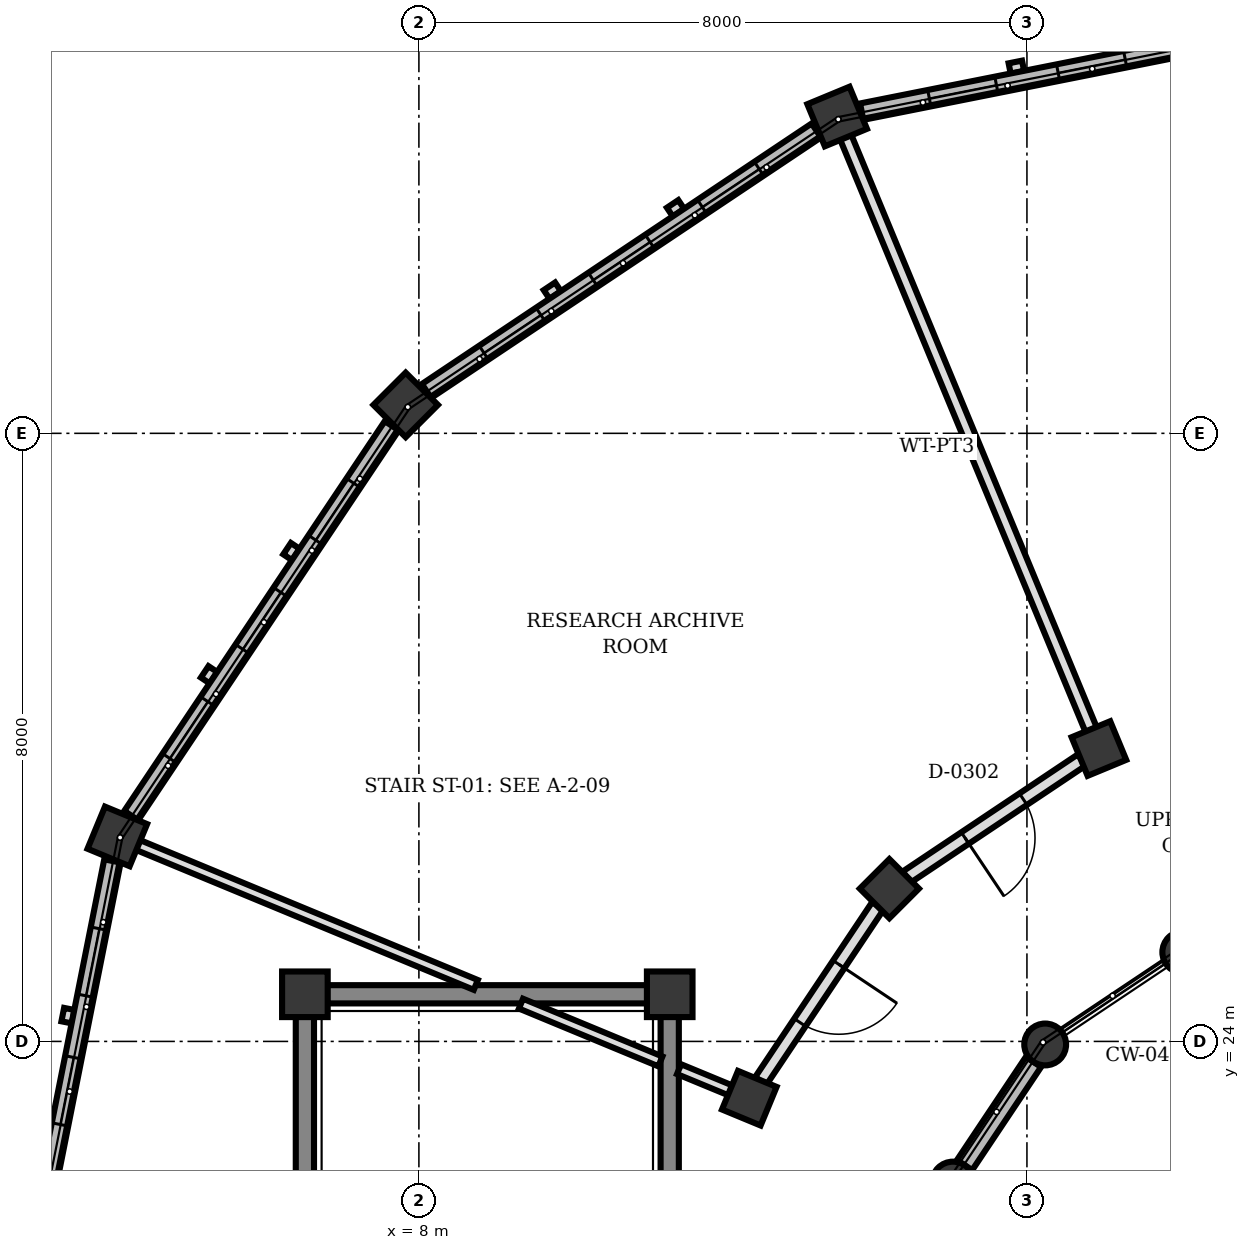
"""IFC4 building model, lengths in metres.
Left out: names, types, materials, properties, quantities, classifications, styles, units other than length and angle.
Written with IfcOpenShell. Run it as: python <this file> out.ifc"""

import sys

from ifc_helpers import new_model, si_unit, direction, frame, frame_2d, origin, origin_2d, place, context, subcontext, project, spatial, rectangle, circle, extrude, element, fill, save


model = new_model("IFC4")
c1 = context("Model", 3, precision=1e-05, world=origin(), true_north=direction((0.0, 1.0)))
c2 = subcontext(c1, "Body", "Model", "MODEL_VIEW")
j1 = project(units=[si_unit("LENGTHUNIT", "METRE"), si_unit("PLANEANGLEUNIT", "RADIAN")], contexts=[c1])
p1 = place(None, origin())
s1 = spatial("IfcSite", under=j1, at=p1, CompositionType="ELEMENT")
p2 = place(p1, origin())
s2 = spatial("IfcBuilding", under=s1, at=p2, CompositionType="ELEMENT")
p3 = place(p2, frame((0.0, 0.0, 8.5)))
s3 = spatial("IfcBuildingStorey", under=s2, at=p3, CompositionType="ELEMENT", Elevation=8.5)
for number, where, z_axis, x_axis in (
    (1, (11.3, 24.62, 0.0), (0.0, 0.0, 1.0), (1.0, 0.0, 0.0)),
    (2, (6.5, 24.62, 0.0), (0.0, 0.0, 1.0), (1.0, 0.0, 0.0)),
):
    element("IfcColumn", number, at=place(p3, frame(where, z_axis=z_axis, x_axis=x_axis)), inside=s3, PredefinedType="COLUMN", context=c2, shape_type="SweptSolid", body=[
        extrude(rectangle(XDim=0.6, YDim=0.6, at=origin_2d()), origin(), (0.0, 0.0, 1.0), 4.0),
    ])
for number, where, z_axis, x_axis in (
    (3, (18.057, 25.174, 0.0), (0.0, 0.0, 1.0), (1.0, 0.0, 0.0)),
    (4, (16.24, 23.96, 0.0), (0.0, 0.0, 1.0), (1.0, 0.0, 0.0)),
    (5, (15.026, 22.143, 0.0), (0.0, 0.0, 1.0), (1.0, 0.0, 0.0)),
):
    element("IfcColumn", number, at=place(p3, frame(where, z_axis=z_axis, x_axis=x_axis)), inside=s3, PredefinedType="COLUMN", context=c2, shape_type="SweptSolid", body=[
        extrude(circle(Radius=0.275, at=origin_2d()), origin(), (0.0, 0.0, 1.0), 4.0),
    ])
for number, where, z_axis, x_axis in (
    (6, (16.947, 27.853, 0.0), (0.0, 0.0, 1.0), (-0.383, 0.924, 0.0)),
    (7, (14.19, 26.01, 0.0), (0.0, 0.0, 1.0), (-0.707, 0.707, 0.0)),
    (8, (12.347, 23.253, 0.0), (0.0, 0.0, 1.0), (-0.924, 0.383, 0.0)),
):
    element("IfcColumn", number, at=place(p3, frame(where, z_axis=z_axis, x_axis=x_axis)), inside=s3, PredefinedType="COLUMN", context=c2, shape_type="SweptSolid", body=[
        extrude(rectangle(XDim=0.55, YDim=0.55, at=origin_2d()), origin(), (0.0, 0.0, 1.0), 4.0),
    ])
for number, where, z_axis, x_axis in (
    (9, (13.503, 36.168, 0.0), (0.0, 0.0, 1.0), (-0.383, 0.924, 0.0)),
    (10, (7.826, 32.374, 0.0), (0.0, 0.0, 1.0), (-0.707, 0.707, 0.0)),
    (11, (4.032, 26.697, 0.0), (0.0, 0.0, 1.0), (-0.924, 0.383, 0.0)),
):
    element("IfcColumn", number, at=place(p3, frame(where, z_axis=z_axis, x_axis=x_axis)), inside=s3, PredefinedType="COLUMN", context=c2, shape_type="SweptSolid", body=[
        extrude(rectangle(XDim=0.6, YDim=0.6, at=origin_2d()), origin(), (0.0, 0.0, 1.0), 4.0),
    ])
p4 = place(p3, frame((13.826, 36.232, 0.0), z_axis=(0.0, 0.0, 1.0), x_axis=(0.980770460131, 0.195164813773, 0.0)))
e12 = element("IfcWall", 12, at=p4, inside=s3, PredefinedType="SOLIDWALL", context=c2, shape_type="SweptSolid", body=[
    extrude(rectangle(XDim=6.17, YDim=0.22, at=frame_2d((3.085, 0.0))), origin(), (0.0, 0.0, 1.0), 3.172),
])
p5 = place(p4, frame((0.907, 0.0, 0.85)))
e13 = element("IfcOpeningElement", 13, at=p5, cuts=e12, PredefinedType="OPENING", context=c2, shape_type="SweptSolid", body=[
    extrude(rectangle(XDim=0.9, YDim=1.4, at=frame_2d((0.45, 0.7))), frame((0.0, 0.12, 0.0), z_axis=(0.0, -1.0, 0.0), x_axis=(1.0, 0.0, 0.0)), (0.0, 0.0, 1.0), 0.24),
])
p6 = place(p4, frame((2.635, 0.0, 0.85)))
e14 = element("IfcOpeningElement", 14, at=p6, cuts=e12, PredefinedType="OPENING", context=c2, shape_type="SweptSolid", body=[
    extrude(rectangle(XDim=0.9, YDim=1.4, at=frame_2d((0.45, 0.7))), frame((0.0, 0.12, 0.0), z_axis=(0.0, -1.0, 0.0), x_axis=(1.0, 0.0, 0.0)), (0.0, 0.0, 1.0), 0.24),
])
p7 = place(p4, frame((4.362, 0.0, 0.85)))
e15 = element("IfcOpeningElement", 15, at=p7, cuts=e12, PredefinedType="OPENING", context=c2, shape_type="SweptSolid", body=[
    extrude(rectangle(XDim=0.9, YDim=1.4, at=frame_2d((0.45, 0.7))), frame((0.0, 0.12, 0.0), z_axis=(0.0, -1.0, 0.0), x_axis=(1.0, 0.0, 0.0)), (0.0, 0.0, 1.0), 0.24),
])
p8 = place(p3, frame((8.1, 32.557, 0.0), z_axis=(0.0, 0.0, 1.0), x_axis=(0.831379966495, 0.555704374025, 0.0)))
e16 = element("IfcWall", 16, at=p8, inside=s3, PredefinedType="SOLIDWALL", context=c2, shape_type="SweptSolid", body=[
    extrude(rectangle(XDim=6.169, YDim=0.22, at=frame_2d((3.084, 0.0))), origin(), (0.0, 0.0, 1.0), 3.172),
])
p9 = place(p8, frame((0.907, 0.0, 0.85)))
e17 = element("IfcOpeningElement", 17, at=p9, cuts=e16, PredefinedType="OPENING", context=c2, shape_type="SweptSolid", body=[
    extrude(rectangle(XDim=0.9, YDim=1.4, at=frame_2d((0.45, 0.7))), frame((0.0, 0.12, 0.0), z_axis=(0.0, -1.0, 0.0), x_axis=(1.0, 0.0, 0.0)), (0.0, 0.0, 1.0), 0.24),
])
p10 = place(p8, frame((2.635, 0.0, 0.85)))
e18 = element("IfcOpeningElement", 18, at=p10, cuts=e16, PredefinedType="OPENING", context=c2, shape_type="SweptSolid", body=[
    extrude(rectangle(XDim=0.9, YDim=1.4, at=frame_2d((0.45, 0.7))), frame((0.0, 0.12, 0.0), z_axis=(0.0, -1.0, 0.0), x_axis=(1.0, 0.0, 0.0)), (0.0, 0.0, 1.0), 0.24),
])
p11 = place(p8, frame((4.362, 0.0, 0.85)))
e19 = element("IfcOpeningElement", 19, at=p11, cuts=e16, PredefinedType="OPENING", context=c2, shape_type="SweptSolid", body=[
    extrude(rectangle(XDim=0.9, YDim=1.4, at=frame_2d((0.45, 0.7))), frame((0.0, 0.12, 0.0), z_axis=(0.0, -1.0, 0.0), x_axis=(1.0, 0.0, 0.0)), (0.0, 0.0, 1.0), 0.24),
])
p12 = place(p3, frame((4.215, 26.971, 0.0), z_axis=(0.0, 0.0, 1.0), x_axis=(0.555658736667, 0.831410469242, 0.0)))
e20 = element("IfcWall", 20, at=p12, inside=s3, PredefinedType="SOLIDWALL", context=c2, shape_type="SweptSolid", body=[
    extrude(rectangle(XDim=6.169, YDim=0.22, at=frame_2d((3.084, 0.0))), origin(), (0.0, 0.0, 1.0), 3.172),
])
p13 = place(p12, frame((0.907, 0.0, 0.85)))
e21 = element("IfcOpeningElement", 21, at=p13, cuts=e20, PredefinedType="OPENING", context=c2, shape_type="SweptSolid", body=[
    extrude(rectangle(XDim=0.9, YDim=1.4, at=frame_2d((0.45, 0.7))), frame((0.0, 0.12, 0.0), z_axis=(0.0, -1.0, 0.0), x_axis=(1.0, 0.0, 0.0)), (0.0, 0.0, 1.0), 0.24),
])
p14 = place(p12, frame((2.635, 0.0, 0.85)))
e22 = element("IfcOpeningElement", 22, at=p14, cuts=e20, PredefinedType="OPENING", context=c2, shape_type="SweptSolid", body=[
    extrude(rectangle(XDim=0.9, YDim=1.4, at=frame_2d((0.45, 0.7))), frame((0.0, 0.12, 0.0), z_axis=(0.0, -1.0, 0.0), x_axis=(1.0, 0.0, 0.0)), (0.0, 0.0, 1.0), 0.24),
])
p15 = place(p12, frame((4.362, 0.0, 0.85)))
e23 = element("IfcOpeningElement", 23, at=p15, cuts=e20, PredefinedType="OPENING", context=c2, shape_type="SweptSolid", body=[
    extrude(rectangle(XDim=0.9, YDim=1.4, at=frame_2d((0.45, 0.7))), frame((0.0, 0.12, 0.0), z_axis=(0.0, -1.0, 0.0), x_axis=(1.0, 0.0, 0.0)), (0.0, 0.0, 1.0), 0.24),
])
p16 = place(p3, frame((16.086, 23.73, 0.0), z_axis=(0.0, 0.0, 1.0), x_axis=(-0.555287078904, -0.83165874011, 0.0)))
e24 = element("IfcWall", 24, at=p16, inside=s3, PredefinedType="SOLIDWALL", context=c2, shape_type="SweptSolid", body=[
    extrude(rectangle(XDim=1.632, YDim=0.24, at=frame_2d((0.816, 0.0))), origin(), (0.0, 0.0, 1.0), 3.222),
])
p17 = place(p3, frame((2.764, 20.323, 0.0), z_axis=(0.0, 0.0, 1.0), x_axis=(0.195164813773, 0.980770460131, 0.0)))
e25 = element("IfcWall", 25, at=p17, inside=s3, PredefinedType="SOLIDWALL", context=c2, shape_type="SweptSolid", body=[
    extrude(rectangle(XDim=6.17, YDim=0.22, at=frame_2d((3.085, 0.0))), origin(), (0.0, 0.0, 1.0), 3.172),
])
p18 = place(p17, frame((0.907, 0.0, 0.85)))
e26 = element("IfcOpeningElement", 26, at=p18, cuts=e25, PredefinedType="OPENING", context=c2, shape_type="SweptSolid", body=[
    extrude(rectangle(XDim=0.9, YDim=1.4, at=frame_2d((0.45, 0.7))), frame((0.0, 0.12, 0.0), z_axis=(0.0, -1.0, 0.0), x_axis=(1.0, 0.0, 0.0)), (0.0, 0.0, 1.0), 0.24),
])
p19 = place(p17, frame((2.635, 0.0, 0.85)))
e27 = element("IfcOpeningElement", 27, at=p19, cuts=e25, PredefinedType="OPENING", context=c2, shape_type="SweptSolid", body=[
    extrude(rectangle(XDim=0.9, YDim=1.4, at=frame_2d((0.45, 0.7))), frame((0.0, 0.12, 0.0), z_axis=(0.0, -1.0, 0.0), x_axis=(1.0, 0.0, 0.0)), (0.0, 0.0, 1.0), 0.24),
])
p20 = place(p17, frame((4.362, 0.0, 0.85)))
e28 = element("IfcOpeningElement", 28, at=p20, cuts=e25, PredefinedType="OPENING", context=c2, shape_type="SweptSolid", body=[
    extrude(rectangle(XDim=0.9, YDim=1.4, at=frame_2d((0.45, 0.7))), frame((0.0, 0.12, 0.0), z_axis=(0.0, -1.0, 0.0), x_axis=(1.0, 0.0, 0.0)), (0.0, 0.0, 1.0), 0.24),
])
p21 = place(p3, frame((6.5, 16.192, 0.0), z_axis=(0.0, 0.0, 1.0), x_axis=(0.0, 1.0, 0.0)))
e29 = element("IfcWall", 29, at=p21, inside=s3, PredefinedType="SHEAR", context=c2, shape_type="SweptSolid", body=[
    extrude(rectangle(XDim=8.136, YDim=0.24, at=frame_2d((4.068, 0.0))), origin(), (0.0, 0.0, 1.0), 3.74),
])
p22 = place(p3, frame((11.3, 24.328, 0.0), z_axis=(0.0, 0.0, 1.0), x_axis=(0.0, -1.0, 0.0)))
e30 = element("IfcWall", 30, at=p22, inside=s3, PredefinedType="SHEAR", context=c2, shape_type="SweptSolid", body=[
    extrude(rectangle(XDim=8.136, YDim=0.24, at=frame_2d((4.068, 0.0))), origin(), (0.0, 0.0, 1.0), 3.74),
])
p23 = place(p22, frame((6.244, 0.0, 0.0)))
e31 = element("IfcOpeningElement", 31, at=p23, cuts=e30, PredefinedType="OPENING", context=c2, shape_type="SweptSolid", body=[
    extrude(rectangle(XDim=0.88, YDim=2.1, at=frame_2d((0.44, 1.05))), frame((0.0, 0.13, 0.0), z_axis=(0.0, -1.0, 0.0), x_axis=(1.0, 0.0, 0.0)), (0.0, 0.0, 1.0), 0.26),
])
p24 = place(p3, frame((11.008, 24.62, 0.0), z_axis=(0.0, 0.0, 1.0), x_axis=(-1.0, 0.0, 0.0)))
e32 = element("IfcWall", 32, at=p24, inside=s3, PredefinedType="SHEAR", context=c2, shape_type="SweptSolid", body=[
    extrude(rectangle(XDim=4.216, YDim=0.24, at=frame_2d((2.108, 0.0))), origin(), (0.0, 0.0, 1.0), 3.74),
])
p25 = place(p3, frame((16.845, 28.1, 0.0), z_axis=(0.0, 0.0, 1.0), x_axis=(-0.382683896966, 0.923879340067, 0.0)))
e33 = element("IfcWall", 33, at=p25, inside=s3, PredefinedType="PARTITIONING", context=c2, shape_type="SweptSolid", body=[
    extrude(rectangle(XDim=8.44, YDim=0.16, at=frame_2d((4.22, 0.0))), origin(), (0.0, 0.0, 1.0), 3.072),
])
p26 = place(p3, frame((12.1, 23.355, 0.0), z_axis=(0.0, 0.0, 1.0), x_axis=(-0.924069600435, 0.382224245113, 0.0)))
e34 = element("IfcWall", 34, at=p26, inside=s3, PredefinedType="PARTITIONING", context=c2, shape_type="SweptSolid", body=[
    extrude(rectangle(XDim=0.733, YDim=0.14, at=frame_2d((0.366, 0.0))), origin(), (0.0, 0.0, 1.0), 3.7),
])
p27 = place(p3, frame((11.177, 23.737, 0.0), z_axis=(0.0, 0.0, 1.0), x_axis=(-0.923817443679, 0.382833293686, 0.0)))
e35 = element("IfcWall", 35, at=p27, inside=s3, PredefinedType="PARTITIONING", context=c2, shape_type="SweptSolid", body=[
    extrude(rectangle(XDim=1.985, YDim=0.14, at=frame_2d((0.993, 0.0))), origin(), (0.0, 0.0, 1.0), 3.7),
])
p28 = place(p3, frame((8.749, 24.743, 0.0), z_axis=(0.0, 0.0, 1.0), x_axis=(-0.923877739946, 0.382687759972, 0.0)))
e36 = element("IfcWall", 36, at=p28, inside=s3, PredefinedType="PARTITIONING", context=c2, shape_type="SweptSolid", body=[
    extrude(rectangle(XDim=4.813, YDim=0.14, at=frame_2d((2.407, 0.0))), origin(), (0.0, 0.0, 1.0), 3.7),
])
p29 = place(p3, frame((16.721, 27.702, 0.0), z_axis=(0.0, 0.0, 1.0), x_axis=(-0.831318045056, -0.555797002478, 0.0)))
e37 = element("IfcWall", 37, at=p29, inside=s3, PredefinedType="PARTITIONING", context=c2, shape_type="SweptSolid", body=[
    extrude(rectangle(XDim=2.773, YDim=0.18, at=frame_2d((1.386, 0.0))), origin(), (0.0, 0.0, 1.0), 3.072),
])
p30 = place(p29, frame((0.926, 0.0, 0.0)))
e38 = element("IfcOpeningElement", 38, at=p30, cuts=e37, PredefinedType="OPENING", context=c2, shape_type="SweptSolid", body=[
    extrude(rectangle(XDim=0.92, YDim=2.1, at=frame_2d((0.46, 1.05))), frame((0.0, 0.1, 0.0), z_axis=(0.0, -1.0, 0.0), x_axis=(1.0, 0.0, 0.0)), (0.0, 0.0, 1.0), 0.2),
])
p31 = place(p3, frame((14.039, 25.784, 0.0), z_axis=(0.0, 0.0, 1.0), x_axis=(-0.555797002478, -0.831318045056, 0.0)))
e39 = element("IfcWall", 39, at=p31, inside=s3, PredefinedType="PARTITIONING", context=c2, shape_type="SweptSolid", body=[
    extrude(rectangle(XDim=2.773, YDim=0.18, at=frame_2d((1.386, 0.0))), origin(), (0.0, 0.0, 1.0), 3.072),
])
p32 = place(p31, frame((0.926, 0.0, 0.0)))
e40 = element("IfcOpeningElement", 40, at=p32, cuts=e39, PredefinedType="OPENING", context=c2, shape_type="SweptSolid", body=[
    extrude(rectangle(XDim=0.92, YDim=2.1, at=frame_2d((0.46, 1.05))), frame((0.0, 0.1, 0.0), z_axis=(0.0, -1.0, 0.0), x_axis=(1.0, 0.0, 0.0)), (0.0, 0.0, 1.0), 0.2),
])
p33 = place(p5, origin())
e41 = element("IfcWindow", 41, at=p33, inside=s3, PartitioningType="SINGLE_PANEL", PredefinedType="WINDOW", context=c2, shape_type="SweptSolid", body=[
    extrude(rectangle(XDim=0.9, YDim=1.4, at=frame_2d((0.45, 0.7))), frame((0.0, 0.03, 0.0), z_axis=(0.0, -1.0, 0.0), x_axis=(1.0, 0.0, 0.0)), (0.0, 0.0, 1.0), 0.06),
])
fill(e13, e41)
p34 = place(p6, origin())
e42 = element("IfcWindow", 42, at=p34, inside=s3, PartitioningType="SINGLE_PANEL", PredefinedType="WINDOW", context=c2, shape_type="SweptSolid", body=[
    extrude(rectangle(XDim=0.9, YDim=1.4, at=frame_2d((0.45, 0.7))), frame((0.0, 0.03, 0.0), z_axis=(0.0, -1.0, 0.0), x_axis=(1.0, 0.0, 0.0)), (0.0, 0.0, 1.0), 0.06),
])
fill(e14, e42)
p35 = place(p9, origin())
e43 = element("IfcWindow", 43, at=p35, inside=s3, PartitioningType="SINGLE_PANEL", PredefinedType="WINDOW", context=c2, shape_type="SweptSolid", body=[
    extrude(rectangle(XDim=0.9, YDim=1.4, at=frame_2d((0.45, 0.7))), frame((0.0, 0.03, 0.0), z_axis=(0.0, -1.0, 0.0), x_axis=(1.0, 0.0, 0.0)), (0.0, 0.0, 1.0), 0.06),
])
fill(e17, e43)
p36 = place(p10, origin())
e44 = element("IfcWindow", 44, at=p36, inside=s3, PartitioningType="SINGLE_PANEL", PredefinedType="WINDOW", context=c2, shape_type="SweptSolid", body=[
    extrude(rectangle(XDim=0.9, YDim=1.4, at=frame_2d((0.45, 0.7))), frame((0.0, 0.03, 0.0), z_axis=(0.0, -1.0, 0.0), x_axis=(1.0, 0.0, 0.0)), (0.0, 0.0, 1.0), 0.06),
])
fill(e18, e44)
p37 = place(p11, origin())
e45 = element("IfcWindow", 45, at=p37, inside=s3, PartitioningType="SINGLE_PANEL", PredefinedType="WINDOW", context=c2, shape_type="SweptSolid", body=[
    extrude(rectangle(XDim=0.9, YDim=1.4, at=frame_2d((0.45, 0.7))), frame((0.0, 0.03, 0.0), z_axis=(0.0, -1.0, 0.0), x_axis=(1.0, 0.0, 0.0)), (0.0, 0.0, 1.0), 0.06),
])
fill(e19, e45)
p38 = place(p13, origin())
e46 = element("IfcWindow", 46, at=p38, inside=s3, PartitioningType="SINGLE_PANEL", PredefinedType="WINDOW", context=c2, shape_type="SweptSolid", body=[
    extrude(rectangle(XDim=0.9, YDim=1.4, at=frame_2d((0.45, 0.7))), frame((0.0, 0.03, 0.0), z_axis=(0.0, -1.0, 0.0), x_axis=(1.0, 0.0, 0.0)), (0.0, 0.0, 1.0), 0.06),
])
fill(e21, e46)
p39 = place(p14, origin())
e47 = element("IfcWindow", 47, at=p39, inside=s3, PartitioningType="SINGLE_PANEL", PredefinedType="WINDOW", context=c2, shape_type="SweptSolid", body=[
    extrude(rectangle(XDim=0.9, YDim=1.4, at=frame_2d((0.45, 0.7))), frame((0.0, 0.03, 0.0), z_axis=(0.0, -1.0, 0.0), x_axis=(1.0, 0.0, 0.0)), (0.0, 0.0, 1.0), 0.06),
])
fill(e22, e47)
p40 = place(p15, origin())
e48 = element("IfcWindow", 48, at=p40, inside=s3, PartitioningType="SINGLE_PANEL", PredefinedType="WINDOW", context=c2, shape_type="SweptSolid", body=[
    extrude(rectangle(XDim=0.9, YDim=1.4, at=frame_2d((0.45, 0.7))), frame((0.0, 0.03, 0.0), z_axis=(0.0, -1.0, 0.0), x_axis=(1.0, 0.0, 0.0)), (0.0, 0.0, 1.0), 0.06),
])
fill(e23, e48)
p41 = place(p19, origin())
e49 = element("IfcWindow", 49, at=p41, inside=s3, PartitioningType="SINGLE_PANEL", PredefinedType="WINDOW", context=c2, shape_type="SweptSolid", body=[
    extrude(rectangle(XDim=0.9, YDim=1.4, at=frame_2d((0.45, 0.7))), frame((0.0, 0.03, 0.0), z_axis=(0.0, -1.0, 0.0), x_axis=(1.0, 0.0, 0.0)), (0.0, 0.0, 1.0), 0.06),
])
fill(e27, e49)
p42 = place(p20, origin())
e50 = element("IfcWindow", 50, at=p42, inside=s3, PartitioningType="SINGLE_PANEL", PredefinedType="WINDOW", context=c2, shape_type="SweptSolid", body=[
    extrude(rectangle(XDim=0.9, YDim=1.4, at=frame_2d((0.45, 0.7))), frame((0.0, 0.03, 0.0), z_axis=(0.0, -1.0, 0.0), x_axis=(1.0, 0.0, 0.0)), (0.0, 0.0, 1.0), 0.06),
])
fill(e28, e50)
p43 = place(p30, origin())
e51 = element("IfcDoor", 51, at=p43, inside=s3, OperationType="SINGLE_SWING_RIGHT", PredefinedType="DOOR", context=c2, shape_type="SweptSolid", body=[
    extrude(rectangle(XDim=0.92, YDim=2.1, at=frame_2d((0.46, 1.05))), frame((0.0, 0.025, 0.0), z_axis=(0.0, -1.0, 0.0), x_axis=(1.0, 0.0, 0.0)), (0.0, 0.0, 1.0), 0.05),
])
fill(e38, e51)
p44 = place(p32, origin())
e52 = element("IfcDoor", 52, at=p44, inside=s3, OperationType="SINGLE_SWING_LEFT", PredefinedType="DOOR", context=c2, shape_type="SweptSolid", body=[
    extrude(rectangle(XDim=0.92, YDim=2.1, at=frame_2d((0.46, 1.05))), frame((0.0, 0.025, 0.0), z_axis=(0.0, -1.0, 0.0), x_axis=(1.0, 0.0, 0.0)), (0.0, 0.0, 1.0), 0.05),
])
fill(e40, e52)
save(model, sys.argv[1])
